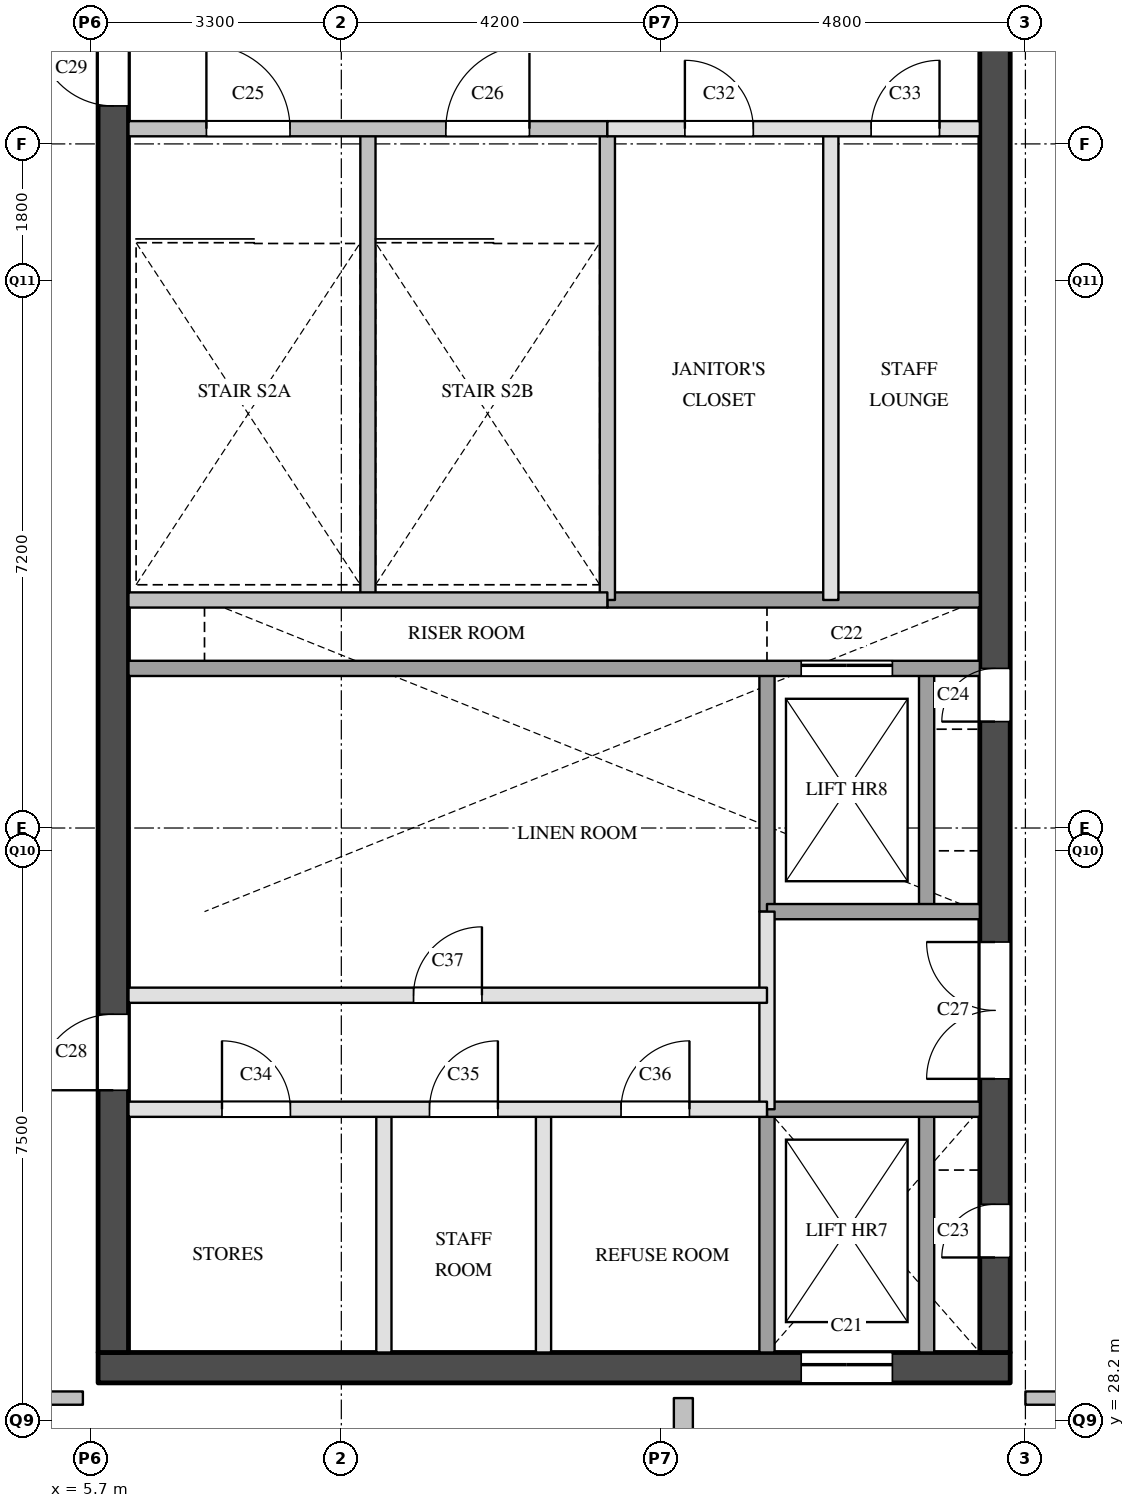
"""IFC4 building model, lengths in metres.
Left out: names, types, materials, properties, quantities, classifications, styles, units other than length and angle.
Written with IfcOpenShell. Run it as: python <this file> out.ifc"""

import sys

from ifc_helpers import new_model, si_unit, direction, frame, frame_2d, origin, place, context, subcontext, project, spatial, rectangle, extrude, element, fill, save


model = new_model("IFC4")
c1 = context("Model", 3, precision=1e-05, world=origin(), true_north=direction((0.0, 1.0)))
c2 = subcontext(c1, "Body", "Model", "MODEL_VIEW")
j1 = project(units=[si_unit("LENGTHUNIT", "METRE"), si_unit("PLANEANGLEUNIT", "RADIAN")], contexts=[c1])
p1 = place(None, origin())
s1 = spatial("IfcSite", under=j1, at=p1, CompositionType="ELEMENT")
p2 = place(p1, origin())
s2 = spatial("IfcBuilding", under=s1, at=p2, CompositionType="ELEMENT")
p3 = place(p2, frame((0.0, 0.0, 230.6)))
s3 = spatial("IfcBuildingStorey", under=s2, at=p3, CompositionType="ELEMENT", Elevation=230.6)
p4 = place(p3, frame((5.8, 28.9, 0.0), z_axis=(0.0, 0.0, 1.0), x_axis=(1.0, 0.0, 0.0)))
e1 = element("IfcWall", 1, at=p4, inside=s3, PredefinedType="SHEAR", context=c2, shape_type="SweptSolid", body=[
    extrude(rectangle(XDim=12.0, YDim=0.4, at=frame_2d((6.0, 0.0))), origin(), (0.0, 0.0, 1.0), 3.6),
])
p5 = place(p4, frame((9.25, 0.0, 0.0)))
e2 = element("IfcOpeningElement", 2, at=p5, cuts=e1, PredefinedType="OPENING", context=c2, shape_type="SweptSolid", body=[
    extrude(rectangle(XDim=1.2, YDim=2.1, at=frame_2d((0.6, 1.05))), frame((0.0, 0.21, 0.0), z_axis=(0.0, -1.0, 0.0), x_axis=(1.0, 0.0, 0.0)), (0.0, 0.0, 1.0), 0.42),
])
p6 = place(p3, frame((6.0, 29.1, 0.0), z_axis=(0.0, 0.0, 1.0), x_axis=(0.0, 1.0, 0.0)))
e3 = element("IfcWall", 3, at=p6, inside=s3, PredefinedType="SHEAR", context=c2, shape_type="SweptSolid", body=[
    extrude(rectangle(XDim=20.3, YDim=0.4, at=frame_2d((10.15, 0.0))), origin(), (0.0, 0.0, 1.0), 3.6),
])
p7 = place(p6, frame((3.45, 0.0, 0.0)))
e4 = element("IfcOpeningElement", 4, at=p7, cuts=e3, PredefinedType="OPENING", context=c2, shape_type="SweptSolid", body=[
    extrude(rectangle(XDim=1.0, YDim=2.1, at=frame_2d((0.5, 1.05))), frame((0.0, 0.21, 0.0), z_axis=(0.0, -1.0, 0.0), x_axis=(1.0, 0.0, 0.0)), (0.0, 0.0, 1.0), 0.42),
])
p8 = place(p6, frame((16.4, 0.0, 0.0)))
e5 = element("IfcOpeningElement", 5, at=p8, cuts=e3, PredefinedType="OPENING", context=c2, shape_type="SweptSolid", body=[
    extrude(rectangle(XDim=1.0, YDim=2.1, at=frame_2d((0.5, 1.05))), frame((0.0, 0.21, 0.0), z_axis=(0.0, -1.0, 0.0), x_axis=(1.0, 0.0, 0.0)), (0.0, 0.0, 1.0), 0.42),
])
p9 = place(p3, frame((17.6, 29.1, 0.0), z_axis=(0.0, 0.0, 1.0), x_axis=(0.0, 1.0, 0.0)))
e6 = element("IfcWall", 6, at=p9, inside=s3, PredefinedType="SHEAR", context=c2, shape_type="SweptSolid", body=[
    extrude(rectangle(XDim=20.3, YDim=0.4, at=frame_2d((10.15, 0.0))), origin(), (0.0, 0.0, 1.0), 3.6),
])
p10 = place(p9, frame((1.25, 0.0, 0.0)))
e7 = element("IfcOpeningElement", 7, at=p10, cuts=e6, PredefinedType="OPENING", context=c2, shape_type="SweptSolid", body=[
    extrude(rectangle(XDim=0.7, YDim=2.1, at=frame_2d((0.35, 1.05))), frame((0.0, 0.21, 0.0), z_axis=(0.0, -1.0, 0.0), x_axis=(1.0, 0.0, 0.0)), (0.0, 0.0, 1.0), 0.42),
])
p11 = place(p9, frame((8.3, 0.0, 0.0)))
e8 = element("IfcOpeningElement", 8, at=p11, cuts=e6, PredefinedType="OPENING", context=c2, shape_type="SweptSolid", body=[
    extrude(rectangle(XDim=0.7, YDim=2.1, at=frame_2d((0.35, 1.05))), frame((0.0, 0.21, 0.0), z_axis=(0.0, -1.0, 0.0), x_axis=(1.0, 0.0, 0.0)), (0.0, 0.0, 1.0), 0.42),
])
p12 = place(p9, frame((3.6, 0.0, 0.0)))
e9 = element("IfcOpeningElement", 9, at=p12, cuts=e6, PredefinedType="OPENING", context=c2, shape_type="SweptSolid", body=[
    extrude(rectangle(XDim=1.8, YDim=2.1, at=frame_2d((0.9, 1.05))), frame((0.0, 0.21, 0.0), z_axis=(0.0, -1.0, 0.0), x_axis=(1.0, 0.0, 0.0)), (0.0, 0.0, 1.0), 0.42),
])
p13 = place(p3, frame((9.35, 39.0, 0.0), z_axis=(0.0, 0.0, 1.0), x_axis=(0.0, 1.0, 0.0)))
e10 = element("IfcWall", 10, at=p13, inside=s3, PredefinedType="SOLIDWALL", context=c2, shape_type="SweptSolid", body=[
    extrude(rectangle(XDim=6.2, YDim=0.2, at=frame_2d((3.1, 0.0))), origin(), (0.0, 0.0, 1.0), 3.6),
])
for number, where, z_axis, x_axis in (
    (11, (9.56, 29.1, 0.0), (0.0, 0.0, 1.0), (0.0, 1.0, 0.0)),
    (12, (11.66, 29.1, 0.0), (0.0, 0.0, 1.0), (0.0, 1.0, 0.0)),
):
    element("IfcWall", number, at=place(p3, frame(where, z_axis=z_axis, x_axis=x_axis)), inside=s3, PredefinedType="PARTITIONING", context=c2, shape_type="SweptSolid", body=[
        extrude(rectangle(XDim=3.2, YDim=0.2, at=frame_2d((1.6, 0.0))), origin(), (0.0, 0.0, 1.0), 3.6),
    ])
p14 = place(p3, frame((12.5, 39.0, 0.0), z_axis=(0.0, 0.0, 1.0), x_axis=(0.0, 1.0, 0.0)))
e13 = element("IfcWall", 13, at=p14, inside=s3, PredefinedType="SOLIDWALL", context=c2, shape_type="SweptSolid", body=[
    extrude(rectangle(XDim=6.2, YDim=0.2, at=frame_2d((3.1, 0.0))), origin(), (0.0, 0.0, 1.0), 3.6),
])
p15 = place(p3, frame((14.6, 32.3, 0.0), z_axis=(0.0, 0.0, 1.0), x_axis=(0.0, 1.0, 0.0)))
e14 = element("IfcWall", 14, at=p15, inside=s3, PredefinedType="PARTITIONING", context=c2, shape_type="SweptSolid", body=[
    extrude(rectangle(XDim=2.6, YDim=0.2, at=frame_2d((1.3, 0.0))), origin(), (0.0, 0.0, 1.0), 3.6),
])
p16 = place(p3, frame((14.6, 29.1, 0.0), z_axis=(0.0, 0.0, 1.0), x_axis=(0.0, 1.0, 0.0)))
e15 = element("IfcWall", 15, at=p16, inside=s3, PredefinedType="SOLIDWALL", context=c2, shape_type="SweptSolid", body=[
    extrude(rectangle(XDim=3.2, YDim=0.2, at=frame_2d((1.6, 0.0))), origin(), (0.0, 0.0, 1.0), 3.6),
])
p17 = place(p3, frame((14.6, 34.9, 0.0), z_axis=(0.0, 0.0, 1.0), x_axis=(0.0, 1.0, 0.0)))
e16 = element("IfcWall", 16, at=p17, inside=s3, PredefinedType="SOLIDWALL", context=c2, shape_type="SweptSolid", body=[
    extrude(rectangle(XDim=3.2, YDim=0.2, at=frame_2d((1.6, 0.0))), origin(), (0.0, 0.0, 1.0), 3.6),
])
p18 = place(p3, frame((15.44, 39.0, 0.0), z_axis=(0.0, 0.0, 1.0), x_axis=(0.0, 1.0, 0.0)))
e17 = element("IfcWall", 17, at=p18, inside=s3, PredefinedType="PARTITIONING", context=c2, shape_type="SweptSolid", body=[
    extrude(rectangle(XDim=6.2, YDim=0.2, at=frame_2d((3.1, 0.0))), origin(), (0.0, 0.0, 1.0), 3.6),
])
p19 = place(p3, frame((16.7, 29.1, 0.0), z_axis=(0.0, 0.0, 1.0), x_axis=(0.0, 1.0, 0.0)))
e18 = element("IfcWall", 18, at=p19, inside=s3, PredefinedType="SOLIDWALL", context=c2, shape_type="SweptSolid", body=[
    extrude(rectangle(XDim=3.2, YDim=0.2, at=frame_2d((1.6, 0.0))), origin(), (0.0, 0.0, 1.0), 3.6),
])
p20 = place(p3, frame((16.7, 34.9, 0.0), z_axis=(0.0, 0.0, 1.0), x_axis=(0.0, 1.0, 0.0)))
e19 = element("IfcWall", 19, at=p20, inside=s3, PredefinedType="SOLIDWALL", context=c2, shape_type="SweptSolid", body=[
    extrude(rectangle(XDim=3.2, YDim=0.2, at=frame_2d((1.6, 0.0))), origin(), (0.0, 0.0, 1.0), 3.6),
])
p21 = place(p3, frame((6.2, 32.3, 0.0), z_axis=(0.0, 0.0, 1.0), x_axis=(1.0, 0.0, 0.0)))
e20 = element("IfcWall", 20, at=p21, inside=s3, PredefinedType="PARTITIONING", context=c2, shape_type="SweptSolid", body=[
    extrude(rectangle(XDim=8.4, YDim=0.2, at=frame_2d((4.2, 0.0))), origin(), (0.0, 0.0, 1.0), 3.6),
])
p22 = place(p21, frame((1.23, 0.0, 0.0)))
e21 = element("IfcOpeningElement", 21, at=p22, cuts=e20, PredefinedType="OPENING", context=c2, shape_type="SweptSolid", body=[
    extrude(rectangle(XDim=0.9, YDim=2.1, at=frame_2d((0.45, 1.05))), frame((0.0, 0.11, 0.0), z_axis=(0.0, -1.0, 0.0), x_axis=(1.0, 0.0, 0.0)), (0.0, 0.0, 1.0), 0.22),
])
p23 = place(p21, frame((3.96, 0.0, 0.0)))
e22 = element("IfcOpeningElement", 22, at=p23, cuts=e20, PredefinedType="OPENING", context=c2, shape_type="SweptSolid", body=[
    extrude(rectangle(XDim=0.9, YDim=2.1, at=frame_2d((0.45, 1.05))), frame((0.0, 0.11, 0.0), z_axis=(0.0, -1.0, 0.0), x_axis=(1.0, 0.0, 0.0)), (0.0, 0.0, 1.0), 0.22),
])
p24 = place(p21, frame((6.48, 0.0, 0.0)))
e23 = element("IfcOpeningElement", 23, at=p24, cuts=e20, PredefinedType="OPENING", context=c2, shape_type="SweptSolid", body=[
    extrude(rectangle(XDim=0.9, YDim=2.1, at=frame_2d((0.45, 1.05))), frame((0.0, 0.11, 0.0), z_axis=(0.0, -1.0, 0.0), x_axis=(1.0, 0.0, 0.0)), (0.0, 0.0, 1.0), 0.22),
])
p25 = place(p3, frame((14.6, 32.3, 0.0), z_axis=(0.0, 0.0, 1.0), x_axis=(1.0, 0.0, 0.0)))
e24 = element("IfcWall", 24, at=p25, inside=s3, PredefinedType="SOLIDWALL", context=c2, shape_type="SweptSolid", body=[
    extrude(rectangle(XDim=2.8, YDim=0.2, at=frame_2d((1.4, 0.0))), origin(), (0.0, 0.0, 1.0), 3.6),
])
p26 = place(p3, frame((6.2, 33.8, 0.0), z_axis=(0.0, 0.0, 1.0), x_axis=(1.0, 0.0, 0.0)))
e25 = element("IfcWall", 25, at=p26, inside=s3, PredefinedType="PARTITIONING", context=c2, shape_type="SweptSolid", body=[
    extrude(rectangle(XDim=8.4, YDim=0.2, at=frame_2d((4.2, 0.0))), origin(), (0.0, 0.0, 1.0), 3.6),
])
p27 = place(p26, frame((3.75, 0.0, 0.0)))
e26 = element("IfcOpeningElement", 26, at=p27, cuts=e25, PredefinedType="OPENING", context=c2, shape_type="SweptSolid", body=[
    extrude(rectangle(XDim=0.9, YDim=2.1, at=frame_2d((0.45, 1.05))), frame((0.0, 0.11, 0.0), z_axis=(0.0, -1.0, 0.0), x_axis=(1.0, 0.0, 0.0)), (0.0, 0.0, 1.0), 0.22),
])
p28 = place(p3, frame((14.6, 34.9, 0.0), z_axis=(0.0, 0.0, 1.0), x_axis=(1.0, 0.0, 0.0)))
e27 = element("IfcWall", 27, at=p28, inside=s3, PredefinedType="SOLIDWALL", context=c2, shape_type="SweptSolid", body=[
    extrude(rectangle(XDim=2.8, YDim=0.2, at=frame_2d((1.4, 0.0))), origin(), (0.0, 0.0, 1.0), 3.6),
])
p29 = place(p3, frame((6.2, 38.1, 0.0), z_axis=(0.0, 0.0, 1.0), x_axis=(1.0, 0.0, 0.0)))
e28 = element("IfcWall", 28, at=p29, inside=s3, PredefinedType="SOLIDWALL", context=c2, shape_type="SweptSolid", body=[
    extrude(rectangle(XDim=11.2, YDim=0.2, at=frame_2d((5.6, 0.0))), origin(), (0.0, 0.0, 1.0), 3.6),
])
p30 = place(p29, frame((8.85, 0.0, 0.0)))
e29 = element("IfcOpeningElement", 29, at=p30, cuts=e28, PredefinedType="OPENING", context=c2, shape_type="SweptSolid", body=[
    extrude(rectangle(XDim=1.2, YDim=2.1, at=frame_2d((0.6, 1.05))), frame((0.0, 0.11, 0.0), z_axis=(0.0, -1.0, 0.0), x_axis=(1.0, 0.0, 0.0)), (0.0, 0.0, 1.0), 0.22),
])
p31 = place(p3, frame((12.5, 39.0, 0.0), z_axis=(0.0, 0.0, 1.0), x_axis=(1.0, 0.0, 0.0)))
e30 = element("IfcWall", 30, at=p31, inside=s3, PredefinedType="SOLIDWALL", context=c2, shape_type="SweptSolid", body=[
    extrude(rectangle(XDim=4.9, YDim=0.2, at=frame_2d((2.45, 0.0))), origin(), (0.0, 0.0, 1.0), 3.6),
])
p32 = place(p3, frame((6.2, 39.0, 0.0), z_axis=(0.0, 0.0, 1.0), x_axis=(1.0, 0.0, 0.0)))
e31 = element("IfcWall", 31, at=p32, inside=s3, PredefinedType="SOLIDWALL", context=c2, shape_type="SweptSolid", body=[
    extrude(rectangle(XDim=6.3, YDim=0.2, at=frame_2d((3.15, 0.0))), origin(), (0.0, 0.0, 1.0), 3.6),
])
p33 = place(p3, frame((12.5, 45.2, 0.0), z_axis=(0.0, 0.0, 1.0), x_axis=(1.0, 0.0, 0.0)))
e32 = element("IfcWall", 32, at=p33, inside=s3, PredefinedType="PARTITIONING", context=c2, shape_type="SweptSolid", body=[
    extrude(rectangle(XDim=4.9, YDim=0.2, at=frame_2d((2.45, 0.0))), origin(), (0.0, 0.0, 1.0), 3.6),
])
p34 = place(p33, frame((1.02, 0.0, 0.0)))
e33 = element("IfcOpeningElement", 33, at=p34, cuts=e32, PredefinedType="OPENING", context=c2, shape_type="SweptSolid", body=[
    extrude(rectangle(XDim=0.9, YDim=2.1, at=frame_2d((0.45, 1.05))), frame((0.0, 0.11, 0.0), z_axis=(0.0, -1.0, 0.0), x_axis=(1.0, 0.0, 0.0)), (0.0, 0.0, 1.0), 0.22),
])
p35 = place(p33, frame((3.47, 0.0, 0.0)))
e34 = element("IfcOpeningElement", 34, at=p35, cuts=e32, PredefinedType="OPENING", context=c2, shape_type="SweptSolid", body=[
    extrude(rectangle(XDim=0.9, YDim=2.1, at=frame_2d((0.45, 1.05))), frame((0.0, 0.11, 0.0), z_axis=(0.0, -1.0, 0.0), x_axis=(1.0, 0.0, 0.0)), (0.0, 0.0, 1.0), 0.22),
])
p36 = place(p3, frame((6.2, 45.2, 0.0), z_axis=(0.0, 0.0, 1.0), x_axis=(1.0, 0.0, 0.0)))
e35 = element("IfcWall", 35, at=p36, inside=s3, PredefinedType="SOLIDWALL", context=c2, shape_type="SweptSolid", body=[
    extrude(rectangle(XDim=6.3, YDim=0.2, at=frame_2d((3.15, 0.0))), origin(), (0.0, 0.0, 1.0), 3.6),
])
p37 = place(p36, frame((1.025, 0.0, 0.0)))
e36 = element("IfcOpeningElement", 36, at=p37, cuts=e35, PredefinedType="OPENING", context=c2, shape_type="SweptSolid", body=[
    extrude(rectangle(XDim=1.1, YDim=2.1, at=frame_2d((0.55, 1.05))), frame((0.0, 0.11, 0.0), z_axis=(0.0, -1.0, 0.0), x_axis=(1.0, 0.0, 0.0)), (0.0, 0.0, 1.0), 0.22),
])
p38 = place(p36, frame((4.175, 0.0, 0.0)))
e37 = element("IfcOpeningElement", 37, at=p38, cuts=e35, PredefinedType="OPENING", context=c2, shape_type="SweptSolid", body=[
    extrude(rectangle(XDim=1.1, YDim=2.1, at=frame_2d((0.55, 1.05))), frame((0.0, 0.11, 0.0), z_axis=(0.0, -1.0, 0.0), x_axis=(1.0, 0.0, 0.0)), (0.0, 0.0, 1.0), 0.22),
])
for number, where, z_axis, x_axis in (
    (38, (4.25, 28.5, 0.0), (0.0, 0.0, 1.0), (1.0, 0.0, 0.0)),
    (39, (18.0, 28.5, 0.0), (0.0, 0.0, 1.0), (1.0, 0.0, 0.0)),
):
    element("IfcWall", number, at=place(p3, frame(where, z_axis=z_axis, x_axis=x_axis)), inside=s3, PredefinedType="PARTITIONING", context=c2, shape_type="SweptSolid", body=[
        extrude(rectangle(XDim=1.35, YDim=0.175, at=frame_2d((0.675, 0.0))), origin(), (0.0, 0.0, 1.0), 3.6),
    ])
p39 = place(p3, frame((13.5, 27.0, 0.0), z_axis=(0.0, 0.0, 1.0), x_axis=(0.0, 1.0, 0.0)))
e40 = element("IfcWall", 40, at=p39, inside=s3, PredefinedType="PARTITIONING", context=c2, shape_type="SweptSolid", body=[
    extrude(rectangle(XDim=1.5, YDim=0.25, at=frame_2d((0.75, 0.0))), origin(), (0.0, 0.0, 1.0), 2.49),
])
p40 = place(p5, origin())
e41 = element("IfcDoor", 41, at=p40, inside=s3, OperationType="SLIDING_TO_LEFT", PredefinedType="DOOR", context=c2, shape_type="SweptSolid", body=[
    extrude(rectangle(XDim=1.2, YDim=2.1, at=frame_2d((0.6, 1.05))), frame((0.0, 0.025, 0.0), z_axis=(0.0, -1.0, 0.0), x_axis=(1.0, 0.0, 0.0)), (0.0, 0.0, 1.0), 0.05),
])
fill(e2, e41)
p41 = place(p30, origin())
e42 = element("IfcDoor", 42, at=p41, inside=s3, OperationType="SLIDING_TO_LEFT", PredefinedType="DOOR", context=c2, shape_type="SweptSolid", body=[
    extrude(rectangle(XDim=1.2, YDim=2.1, at=frame_2d((0.6, 1.05))), frame((0.0, 0.025, 0.0), z_axis=(0.0, -1.0, 0.0), x_axis=(1.0, 0.0, 0.0)), (0.0, 0.0, 1.0), 0.05),
])
fill(e29, e42)
p42 = place(p10, origin())
e43 = element("IfcDoor", 43, at=p42, inside=s3, OperationType="SINGLE_SWING_LEFT", PredefinedType="DOOR", context=c2, shape_type="SweptSolid", body=[
    extrude(rectangle(XDim=0.7, YDim=2.1, at=frame_2d((0.35, 1.05))), frame((0.0, 0.025, 0.0), z_axis=(0.0, -1.0, 0.0), x_axis=(1.0, 0.0, 0.0)), (0.0, 0.0, 1.0), 0.05),
])
fill(e7, e43)
p43 = place(p11, origin())
e44 = element("IfcDoor", 44, at=p43, inside=s3, OperationType="SINGLE_SWING_LEFT", PredefinedType="DOOR", context=c2, shape_type="SweptSolid", body=[
    extrude(rectangle(XDim=0.7, YDim=2.1, at=frame_2d((0.35, 1.05))), frame((0.0, 0.025, 0.0), z_axis=(0.0, -1.0, 0.0), x_axis=(1.0, 0.0, 0.0)), (0.0, 0.0, 1.0), 0.05),
])
fill(e8, e44)
p44 = place(p37, origin())
e45 = element("IfcDoor", 45, at=p44, inside=s3, OperationType="SINGLE_SWING_LEFT", PredefinedType="DOOR", context=c2, shape_type="SweptSolid", body=[
    extrude(rectangle(XDim=1.1, YDim=2.1, at=frame_2d((0.55, 1.05))), frame((0.0, 0.025, 0.0), z_axis=(0.0, -1.0, 0.0), x_axis=(1.0, 0.0, 0.0)), (0.0, 0.0, 1.0), 0.05),
])
fill(e36, e45)
p45 = place(p38, origin())
e46 = element("IfcDoor", 46, at=p45, inside=s3, OperationType="SINGLE_SWING_RIGHT", PredefinedType="DOOR", context=c2, shape_type="SweptSolid", body=[
    extrude(rectangle(XDim=1.1, YDim=2.1, at=frame_2d((0.55, 1.05))), frame((0.0, 0.025, 0.0), z_axis=(0.0, -1.0, 0.0), x_axis=(1.0, 0.0, 0.0)), (0.0, 0.0, 1.0), 0.05),
])
fill(e37, e46)
p46 = place(p12, origin())
e47 = element("IfcDoor", 47, at=p46, inside=s3, OperationType="DOUBLE_DOOR_SINGLE_SWING", PredefinedType="DOOR", context=c2, shape_type="SweptSolid", body=[
    extrude(rectangle(XDim=1.8, YDim=2.1, at=frame_2d((0.9, 1.05))), frame((0.0, 0.025, 0.0), z_axis=(0.0, -1.0, 0.0), x_axis=(1.0, 0.0, 0.0)), (0.0, 0.0, 1.0), 0.05),
])
fill(e9, e47)
p47 = place(p7, origin())
e48 = element("IfcDoor", 48, at=p47, inside=s3, OperationType="SINGLE_SWING_LEFT", PredefinedType="DOOR", context=c2, shape_type="SweptSolid", body=[
    extrude(rectangle(XDim=1.0, YDim=2.1, at=frame_2d((0.5, 1.05))), frame((0.0, 0.025, 0.0), z_axis=(0.0, -1.0, 0.0), x_axis=(1.0, 0.0, 0.0)), (0.0, 0.0, 1.0), 0.05),
])
fill(e4, e48)
p48 = place(p8, origin())
e49 = element("IfcDoor", 49, at=p48, inside=s3, OperationType="SINGLE_SWING_RIGHT", PredefinedType="DOOR", context=c2, shape_type="SweptSolid", body=[
    extrude(rectangle(XDim=1.0, YDim=2.1, at=frame_2d((0.5, 1.05))), frame((0.0, 0.025, 0.0), z_axis=(0.0, -1.0, 0.0), x_axis=(1.0, 0.0, 0.0)), (0.0, 0.0, 1.0), 0.05),
])
fill(e5, e49)
p49 = place(p34, origin())
e50 = element("IfcDoor", 50, at=p49, inside=s3, OperationType="SINGLE_SWING_LEFT", PredefinedType="DOOR", context=c2, shape_type="SweptSolid", body=[
    extrude(rectangle(XDim=0.9, YDim=2.1, at=frame_2d((0.45, 1.05))), frame((0.0, 0.025, 0.0), z_axis=(0.0, -1.0, 0.0), x_axis=(1.0, 0.0, 0.0)), (0.0, 0.0, 1.0), 0.05),
])
fill(e33, e50)
p50 = place(p35, origin())
e51 = element("IfcDoor", 51, at=p50, inside=s3, OperationType="SINGLE_SWING_RIGHT", PredefinedType="DOOR", context=c2, shape_type="SweptSolid", body=[
    extrude(rectangle(XDim=0.9, YDim=2.1, at=frame_2d((0.45, 1.05))), frame((0.0, 0.025, 0.0), z_axis=(0.0, -1.0, 0.0), x_axis=(1.0, 0.0, 0.0)), (0.0, 0.0, 1.0), 0.05),
])
fill(e34, e51)
p51 = place(p22, origin())
e52 = element("IfcDoor", 52, at=p51, inside=s3, OperationType="SINGLE_SWING_LEFT", PredefinedType="DOOR", context=c2, shape_type="SweptSolid", body=[
    extrude(rectangle(XDim=0.9, YDim=2.1, at=frame_2d((0.45, 1.05))), frame((0.0, 0.025, 0.0), z_axis=(0.0, -1.0, 0.0), x_axis=(1.0, 0.0, 0.0)), (0.0, 0.0, 1.0), 0.05),
])
fill(e21, e52)
p52 = place(p23, origin())
e53 = element("IfcDoor", 53, at=p52, inside=s3, OperationType="SINGLE_SWING_RIGHT", PredefinedType="DOOR", context=c2, shape_type="SweptSolid", body=[
    extrude(rectangle(XDim=0.9, YDim=2.1, at=frame_2d((0.45, 1.05))), frame((0.0, 0.025, 0.0), z_axis=(0.0, -1.0, 0.0), x_axis=(1.0, 0.0, 0.0)), (0.0, 0.0, 1.0), 0.05),
])
fill(e22, e53)
p53 = place(p24, origin())
e54 = element("IfcDoor", 54, at=p53, inside=s3, OperationType="SINGLE_SWING_RIGHT", PredefinedType="DOOR", context=c2, shape_type="SweptSolid", body=[
    extrude(rectangle(XDim=0.9, YDim=2.1, at=frame_2d((0.45, 1.05))), frame((0.0, 0.025, 0.0), z_axis=(0.0, -1.0, 0.0), x_axis=(1.0, 0.0, 0.0)), (0.0, 0.0, 1.0), 0.05),
])
fill(e23, e54)
p54 = place(p27, origin())
e55 = element("IfcDoor", 55, at=p54, inside=s3, OperationType="SINGLE_SWING_RIGHT", PredefinedType="DOOR", context=c2, shape_type="SweptSolid", body=[
    extrude(rectangle(XDim=0.9, YDim=2.1, at=frame_2d((0.45, 1.05))), frame((0.0, 0.025, 0.0), z_axis=(0.0, -1.0, 0.0), x_axis=(1.0, 0.0, 0.0)), (0.0, 0.0, 1.0), 0.05),
])
fill(e26, e55)
save(model, sys.argv[1])
